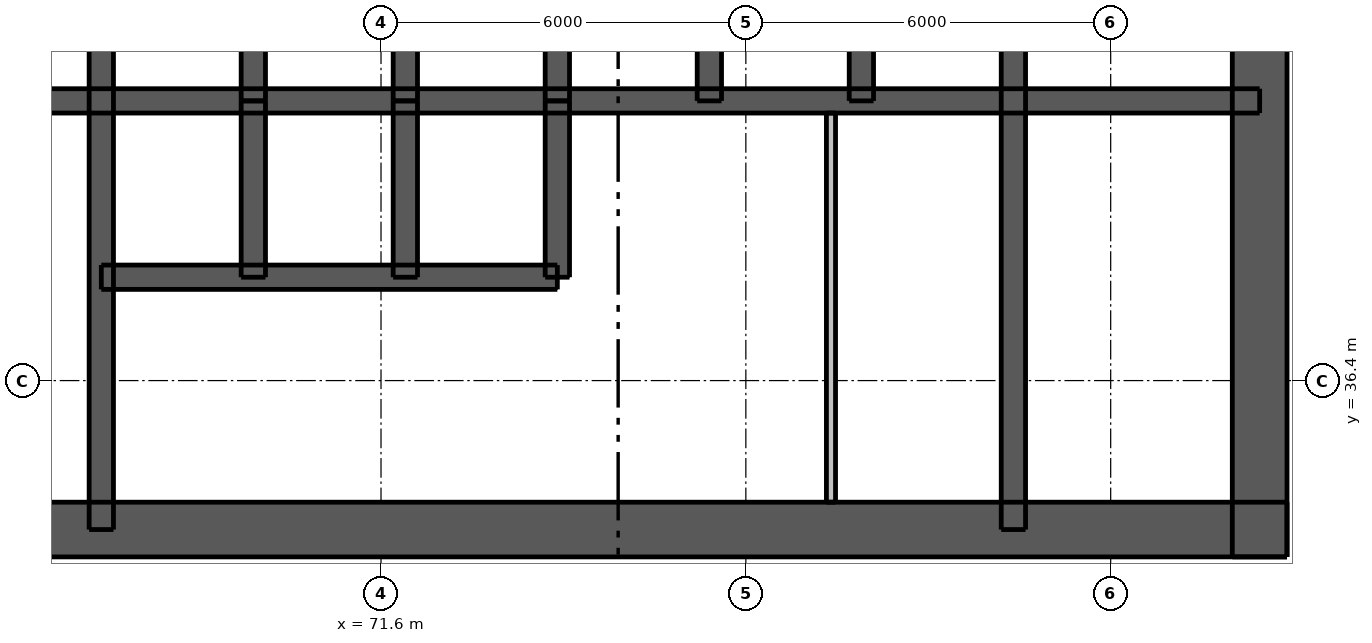
"""IFC4 building model, lengths in metres.
Left out: names, types, materials, properties, quantities, classifications, styles, units other than length and angle.
Written with IfcOpenShell. Run it as: python <this file> out.ifc"""

import sys

from ifc_helpers import new_model, si_unit, direction, frame, frame_2d, origin, place, context, subcontext, project, spatial, rectangle, extrude, element, fill, save


model = new_model("IFC4")
c1 = context("Model", 3, precision=1e-05, world=origin(), true_north=direction((0.0, 1.0)))
c2 = subcontext(c1, "Body", "Model", "MODEL_VIEW")
j1 = project(units=[si_unit("LENGTHUNIT", "METRE"), si_unit("PLANEANGLEUNIT", "RADIAN")], contexts=[c1])
p1 = place(None, origin())
s1 = spatial("IfcSite", under=j1, at=p1, CompositionType="ELEMENT")
p2 = place(p1, origin())
s2 = spatial("IfcBuilding", under=s1, at=p2, CompositionType="ELEMENT")
p3 = place(p2, frame((0.0, 0.0, 46.6)))
s3 = spatial("IfcBuildingStorey", under=s2, at=p3, CompositionType="ELEMENT", Elevation=46.6)
p4 = place(p3, frame((62.5, 33.95, 0.0), z_axis=(0.0, 0.0, 1.0), x_axis=(1.0, 0.0, 0.0)))
e1 = element("IfcWall", 1, at=p4, inside=s3, PredefinedType="SHEAR", context=c2, shape_type="SweptSolid", body=[
    extrude(rectangle(XDim=24.0, YDim=0.9, at=frame_2d((12.0, 0.0))), origin(), (0.0, 0.0, 1.0), 3.05),
])
p5 = place(p4, frame((2.05, 0.0, 0.0)))
e2 = element("IfcOpeningElement", 2, at=p5, cuts=e1, PredefinedType="OPENING", context=c2, shape_type="SweptSolid", body=[
    extrude(rectangle(XDim=1.1, YDim=2.1, at=frame_2d((0.55, 1.05))), frame((0.0, 0.46, 0.0), z_axis=(0.0, -1.0, 0.0), x_axis=(1.0, 0.0, 0.0)), (0.0, 0.0, 1.0), 0.92),
])
p6 = place(p4, frame((20.85, 0.0, 0.0)))
e3 = element("IfcOpeningElement", 3, at=p6, cuts=e1, PredefinedType="OPENING", context=c2, shape_type="SweptSolid", body=[
    extrude(rectangle(XDim=1.1, YDim=2.1, at=frame_2d((0.55, 1.05))), frame((0.0, 0.46, 0.0), z_axis=(0.0, -1.0, 0.0), x_axis=(1.0, 0.0, 0.0)), (0.0, 0.0, 1.0), 0.92),
])
p7 = place(p4, frame((8.0, 0.0, 0.0)))
e4 = element("IfcOpeningElement", 4, at=p7, cuts=e1, PredefinedType="OPENING", context=c2, shape_type="SweptSolid", body=[
    extrude(rectangle(XDim=1.1, YDim=2.1, at=frame_2d((0.55, 1.05))), frame((0.0, 0.46, 0.0), z_axis=(0.0, -1.0, 0.0), x_axis=(1.0, 0.0, 0.0)), (0.0, 0.0, 1.0), 0.92),
])
p8 = place(p4, frame((17.488, 0.0, 0.0)))
e5 = element("IfcOpeningElement", 5, at=p8, cuts=e1, PredefinedType="OPENING", context=c2, shape_type="SweptSolid", body=[
    extrude(rectangle(XDim=0.9, YDim=2.1, at=frame_2d((0.45, 1.05))), frame((0.0, 0.46, 0.0), z_axis=(0.0, -1.0, 0.0), x_axis=(1.0, 0.0, 0.0)), (0.0, 0.0, 1.0), 0.92),
])
p9 = place(p3, frame((86.05, 33.5, 0.0), z_axis=(0.0, 0.0, 1.0), x_axis=(0.0, 1.0, 0.0)))
e6 = element("IfcWall", 6, at=p9, inside=s3, PredefinedType="SHEAR", context=c2, shape_type="SweptSolid", body=[
    extrude(rectangle(XDim=24.0, YDim=0.9, at=frame_2d((12.0, 0.0))), origin(), (0.0, 0.0, 1.0), 3.05),
])
p10 = place(p9, frame((11.2, 0.0, 0.0)))
e7 = element("IfcOpeningElement", 7, at=p10, cuts=e6, PredefinedType="OPENING", context=c2, shape_type="SweptSolid", body=[
    extrude(rectangle(XDim=1.6, YDim=2.1, at=frame_2d((0.8, 1.05))), frame((0.0, 0.46, 0.0), z_axis=(0.0, -1.0, 0.0), x_axis=(1.0, 0.0, 0.0)), (0.0, 0.0, 1.0), 0.92),
])
p11 = place(p3, frame((62.95, 41.0, 0.0), z_axis=(0.0, 0.0, 1.0), x_axis=(1.0, 0.0, 0.0)))
e8 = element("IfcWall", 8, at=p11, inside=s3, PredefinedType="SHEAR", context=c2, shape_type="SweptSolid", body=[
    extrude(rectangle(XDim=23.1, YDim=0.4, at=frame_2d((11.55, 0.0))), origin(), (0.0, 0.0, 1.0), 3.05),
])
p12 = place(p3, frame((67.0, 33.95, 0.0), z_axis=(0.0, 0.0, 1.0), x_axis=(0.0, 1.0, 0.0)))
e9 = element("IfcWall", 9, at=p12, inside=s3, PredefinedType="SHEAR", context=c2, shape_type="SweptSolid", body=[
    extrude(rectangle(XDim=9.95, YDim=0.4, at=frame_2d((4.975, 0.0))), origin(), (0.0, 0.0, 1.0), 3.05),
])
p13 = place(p12, frame((0.65, 0.0, 0.0)))
e10 = element("IfcOpeningElement", 10, at=p13, cuts=e9, PredefinedType="OPENING", context=c2, shape_type="SweptSolid", body=[
    extrude(rectangle(XDim=1.1, YDim=2.1, at=frame_2d((0.55, 1.05))), frame((0.0, 0.21, 0.0), z_axis=(0.0, -1.0, 0.0), x_axis=(1.0, 0.0, 0.0)), (0.0, 0.0, 1.0), 0.42),
])
p14 = place(p3, frame((82.0, 33.95, 0.0), z_axis=(0.0, 0.0, 1.0), x_axis=(0.0, 1.0, 0.0)))
e11 = element("IfcWall", 11, at=p14, inside=s3, PredefinedType="SHEAR", context=c2, shape_type="SweptSolid", body=[
    extrude(rectangle(XDim=9.95, YDim=0.4, at=frame_2d((4.975, 0.0))), origin(), (0.0, 0.0, 1.0), 3.05),
])
for number, where, z_axis, x_axis in (
    (12, (69.5, 41.0, 0.0), (0.0, 0.0, 1.0), (0.0, 1.0, 0.0)),
    (13, (72.0, 41.0, 0.0), (0.0, 0.0, 1.0), (0.0, 1.0, 0.0)),
    (14, (74.5, 41.0, 0.0), (0.0, 0.0, 1.0), (0.0, 1.0, 0.0)),
    (15, (77.0, 41.0, 0.0), (0.0, 0.0, 1.0), (0.0, 1.0, 0.0)),
    (16, (79.5, 41.0, 0.0), (0.0, 0.0, 1.0), (0.0, 1.0, 0.0)),
):
    element("IfcWall", number, at=place(p3, frame(where, z_axis=z_axis, x_axis=x_axis)), inside=s3, PredefinedType="SHEAR", context=c2, shape_type="SweptSolid", body=[
        extrude(rectangle(XDim=2.9, YDim=0.4, at=frame_2d((1.45, 0.0))), origin(), (0.0, 0.0, 1.0), 3.05),
    ])
p15 = place(p3, frame((67.0, 38.1, 0.0), z_axis=(0.0, 0.0, 1.0), x_axis=(1.0, 0.0, 0.0)))
e17 = element("IfcWall", 17, at=p15, inside=s3, PredefinedType="SHEAR", context=c2, shape_type="SweptSolid", body=[
    extrude(rectangle(XDim=7.5, YDim=0.4, at=frame_2d((3.75, 0.0))), origin(), (0.0, 0.0, 1.0), 3.05),
])
p16 = place(p15, frame((0.7, 0.0, 0.0)))
e18 = element("IfcOpeningElement", 18, at=p16, cuts=e17, PredefinedType="OPENING", context=c2, shape_type="SweptSolid", body=[
    extrude(rectangle(XDim=1.1, YDim=2.1, at=frame_2d((0.55, 1.05))), frame((0.0, 0.21, 0.0), z_axis=(0.0, -1.0, 0.0), x_axis=(1.0, 0.0, 0.0)), (0.0, 0.0, 1.0), 0.42),
])
p17 = place(p15, frame((3.2, 0.0, 0.0)))
e19 = element("IfcOpeningElement", 19, at=p17, cuts=e17, PredefinedType="OPENING", context=c2, shape_type="SweptSolid", body=[
    extrude(rectangle(XDim=1.1, YDim=2.1, at=frame_2d((0.55, 1.05))), frame((0.0, 0.21, 0.0), z_axis=(0.0, -1.0, 0.0), x_axis=(1.0, 0.0, 0.0)), (0.0, 0.0, 1.0), 0.42),
])
p18 = place(p15, frame((5.65, 0.0, 0.0)))
e20 = element("IfcOpeningElement", 20, at=p18, cuts=e17, PredefinedType="OPENING", context=c2, shape_type="SweptSolid", body=[
    extrude(rectangle(XDim=1.2, YDim=2.1, at=frame_2d((0.6, 1.05))), frame((0.0, 0.21, 0.0), z_axis=(0.0, -1.0, 0.0), x_axis=(1.0, 0.0, 0.0)), (0.0, 0.0, 1.0), 0.42),
])
for number, where, z_axis, x_axis in (
    (21, (69.5, 38.1, 0.0), (0.0, 0.0, 1.0), (0.0, 1.0, 0.0)),
    (22, (72.0, 38.1, 0.0), (0.0, 0.0, 1.0), (0.0, 1.0, 0.0)),
    (23, (74.5, 38.1, 0.0), (0.0, 0.0, 1.0), (0.0, 1.0, 0.0)),
):
    element("IfcWall", number, at=place(p3, frame(where, z_axis=z_axis, x_axis=x_axis)), inside=s3, PredefinedType="SHEAR", context=c2, shape_type="SweptSolid", body=[
        extrude(rectangle(XDim=2.9, YDim=0.4, at=frame_2d((1.45, 0.0))), origin(), (0.0, 0.0, 1.0), 3.05),
    ])
p19 = place(p3, frame((79.0, 34.4, 0.0), z_axis=(0.0, 0.0, 1.0), x_axis=(0.0, 1.0, 0.0)))
e24 = element("IfcWall", 24, at=p19, inside=s3, PredefinedType="PLUMBINGWALL", context=c2, shape_type="SweptSolid", body=[
    extrude(rectangle(XDim=6.4, YDim=0.15, at=frame_2d((3.2, 0.0))), origin(), (0.0, 0.0, 1.0), 3.05),
])
p20 = place(p6, origin())
e25 = element("IfcDoor", 25, at=p20, inside=s3, OperationType="SINGLE_SWING_RIGHT", PredefinedType="DOOR", context=c2, shape_type="SweptSolid", body=[
    extrude(rectangle(XDim=1.1, YDim=2.1, at=frame_2d((0.55, 1.05))), frame((0.0, 0.438, 0.0), z_axis=(0.0, -1.0, 0.0), x_axis=(1.0, 0.0, 0.0)), (0.0, 0.0, 1.0), 0.05),
])
fill(e3, e25)
p21 = place(p7, origin())
e26 = element("IfcDoor", 26, at=p21, inside=s3, OperationType="SINGLE_SWING_LEFT", PredefinedType="DOOR", context=c2, shape_type="SweptSolid", body=[
    extrude(rectangle(XDim=1.1, YDim=2.1, at=frame_2d((0.55, 1.05))), frame((0.0, 0.438, 0.0), z_axis=(0.0, -1.0, 0.0), x_axis=(1.0, 0.0, 0.0)), (0.0, 0.0, 1.0), 0.05),
])
fill(e4, e26)
p22 = place(p13, origin())
e27 = element("IfcDoor", 27, at=p22, inside=s3, OperationType="SINGLE_SWING_RIGHT", PredefinedType="DOOR", context=c2, shape_type="SweptSolid", body=[
    extrude(rectangle(XDim=1.1, YDim=2.1, at=frame_2d((0.55, 1.05))), frame((0.0, -0.138, 0.0), z_axis=(0.0, -1.0, 0.0), x_axis=(1.0, 0.0, 0.0)), (0.0, 0.0, 1.0), 0.05),
])
fill(e10, e27)
p23 = place(p8, origin())
e28 = element("IfcDoor", 28, at=p23, inside=s3, OperationType="SINGLE_SWING_LEFT", PredefinedType="DOOR", context=c2, shape_type="SweptSolid", body=[
    extrude(rectangle(XDim=0.9, YDim=2.1, at=frame_2d((0.45, 1.05))), frame((0.0, 0.438, 0.0), z_axis=(0.0, -1.0, 0.0), x_axis=(1.0, 0.0, 0.0)), (0.0, 0.0, 1.0), 0.05),
])
fill(e5, e28)
p24 = place(p16, origin())
e29 = element("IfcDoor", 29, at=p24, inside=s3, OperationType="DOUBLE_DOOR_SLIDING", PredefinedType="DOOR", context=c2, shape_type="SweptSolid", body=[
    extrude(rectangle(XDim=1.1, YDim=2.1, at=frame_2d((0.55, 1.05))), frame((0.0, 0.025, 0.0), z_axis=(0.0, -1.0, 0.0), x_axis=(1.0, 0.0, 0.0)), (0.0, 0.0, 1.0), 0.05),
])
fill(e18, e29)
p25 = place(p17, origin())
e30 = element("IfcDoor", 30, at=p25, inside=s3, OperationType="DOUBLE_DOOR_SLIDING", PredefinedType="DOOR", context=c2, shape_type="SweptSolid", body=[
    extrude(rectangle(XDim=1.1, YDim=2.1, at=frame_2d((0.55, 1.05))), frame((0.0, 0.025, 0.0), z_axis=(0.0, -1.0, 0.0), x_axis=(1.0, 0.0, 0.0)), (0.0, 0.0, 1.0), 0.05),
])
fill(e19, e30)
p26 = place(p18, origin())
e31 = element("IfcDoor", 31, at=p26, inside=s3, OperationType="DOUBLE_DOOR_SLIDING", PredefinedType="DOOR", context=c2, shape_type="SweptSolid", body=[
    extrude(rectangle(XDim=1.2, YDim=2.1, at=frame_2d((0.6, 1.05))), frame((0.0, 0.025, 0.0), z_axis=(0.0, -1.0, 0.0), x_axis=(1.0, 0.0, 0.0)), (0.0, 0.0, 1.0), 0.05),
])
fill(e20, e31)
save(model, sys.argv[1])
